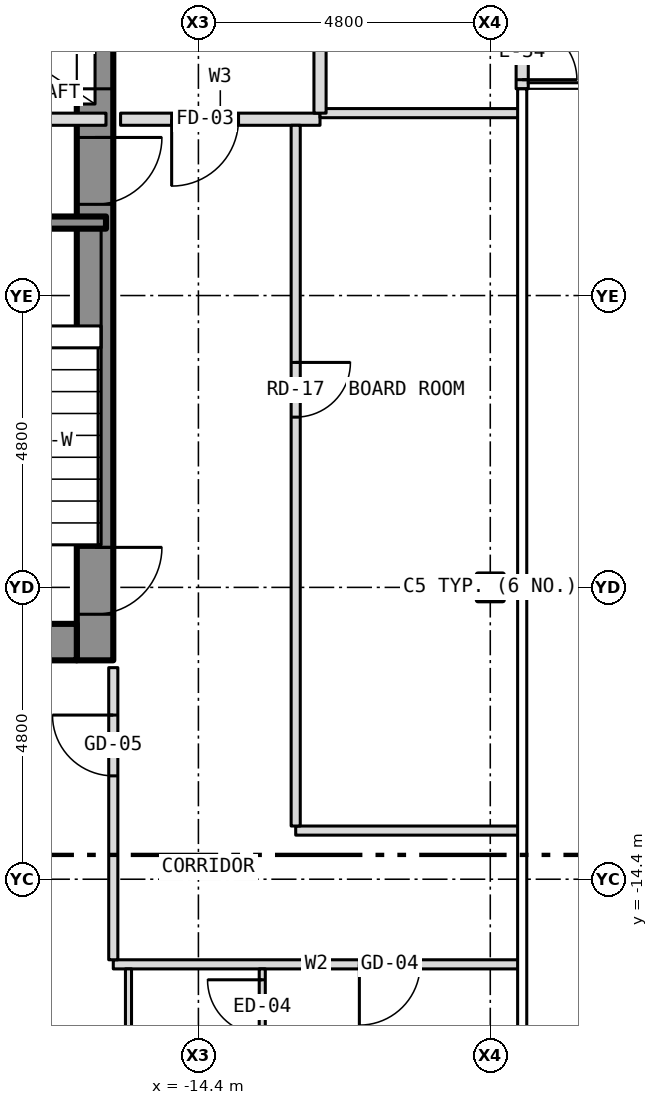
"""IFC4 building model, lengths in metres.
Left out: names, types, materials, properties, quantities, classifications, styles, units other than length and angle.
Written with IfcOpenShell. Run it as: python <this file> out.ifc"""

import sys

from ifc_helpers import new_model, si_unit, direction, frame, frame_2d, origin, origin_2d, place, context, subcontext, project, spatial, rectangle, i_section, extrude, element, fill, save


model = new_model("IFC4")
c1 = context("Model", 3, precision=1e-05, world=origin(), true_north=direction((0.0, 1.0)))
c2 = subcontext(c1, "Body", "Model", "MODEL_VIEW")
j1 = project(units=[si_unit("LENGTHUNIT", "METRE"), si_unit("PLANEANGLEUNIT", "RADIAN")], contexts=[c1])
p1 = place(None, origin())
s1 = spatial("IfcSite", under=j1, at=p1, CompositionType="ELEMENT")
p2 = place(p1, origin())
s2 = spatial("IfcBuilding", under=s1, at=p2, CompositionType="ELEMENT")
p3 = place(p2, frame((0.0, 0.0, 74.0)))
s3 = spatial("IfcBuildingStorey", under=s2, at=p3, CompositionType="ELEMENT", Elevation=74.0)
p4 = place(p3, frame((-9.6, -9.6, -0.15), z_axis=(0.0, 0.0, 1.0), x_axis=(1.0, 0.0, 0.0)))
e1 = element("IfcColumn", 1, at=p4, inside=s3, PredefinedType="COLUMN", context=c2, shape_type="SweptSolid", body=[
    extrude(i_section(OverallWidth=0.409, OverallDepth=0.424, WebThickness=0.033, FlangeThickness=0.052, at=origin_2d()), origin(), (0.0, 0.0, 1.0), 3.5),
])
p5 = place(p3, frame((-16.1, -10.8, 0.0), z_axis=(0.0, 0.0, 1.0), x_axis=(0.0, 1.0, 0.0)))
e2 = element("IfcWall", 2, at=p5, inside=s3, PredefinedType="SHEAR", context=c2, shape_type="SweptSolid", body=[
    extrude(rectangle(XDim=21.6, YDim=0.6, at=frame_2d((10.8, 0.0))), origin(), (0.0, 0.0, 1.0), 3.25),
])
p6 = place(p5, frame((9.4, 0.0, 0.0)))
e3 = element("IfcOpeningElement", 3, at=p6, cuts=e2, PredefinedType="OPENING", context=c2, shape_type="SweptSolid", body=[
    extrude(rectangle(XDim=1.1, YDim=2.1, at=frame_2d((0.55, 1.05))), frame((0.0, 0.312, 0.0), z_axis=(0.0, -1.0, 0.0), x_axis=(1.0, 0.0, 0.0)), (0.0, 0.0, 1.0), 0.624),
])
p7 = place(p5, frame((11.5, 0.0, 0.0)))
e4 = element("IfcOpeningElement", 4, at=p7, cuts=e2, PredefinedType="OPENING", context=c2, shape_type="SweptSolid", body=[
    extrude(rectangle(XDim=1.1, YDim=2.1, at=frame_2d((0.55, 1.05))), frame((0.0, 0.312, 0.0), z_axis=(0.0, -1.0, 0.0), x_axis=(1.0, 0.0, 0.0)), (0.0, 0.0, 1.0), 0.624),
])
p8 = place(p5, frame((13.6, 0.0, 0.0)))
e5 = element("IfcOpeningElement", 5, at=p8, cuts=e2, PredefinedType="OPENING", context=c2, shape_type="SweptSolid", body=[
    extrude(rectangle(XDim=1.1, YDim=2.1, at=frame_2d((0.55, 1.05))), frame((0.0, 0.312, 0.0), z_axis=(0.0, -1.0, 0.0), x_axis=(1.0, 0.0, 0.0)), (0.0, 0.0, 1.0), 0.624),
])
p9 = place(p5, frame((15.7, 0.0, 0.0)))
e6 = element("IfcOpeningElement", 6, at=p9, cuts=e2, PredefinedType="OPENING", context=c2, shape_type="SweptSolid", body=[
    extrude(rectangle(XDim=1.1, YDim=2.1, at=frame_2d((0.55, 1.05))), frame((0.0, 0.312, 0.0), z_axis=(0.0, -1.0, 0.0), x_axis=(1.0, 0.0, 0.0)), (0.0, 0.0, 1.0), 0.624),
])
p10 = place(p5, frame((17.8, 0.0, 0.0)))
e7 = element("IfcOpeningElement", 7, at=p10, cuts=e2, PredefinedType="OPENING", context=c2, shape_type="SweptSolid", body=[
    extrude(rectangle(XDim=1.1, YDim=2.1, at=frame_2d((0.55, 1.05))), frame((0.0, 0.312, 0.0), z_axis=(0.0, -1.0, 0.0), x_axis=(1.0, 0.0, 0.0)), (0.0, 0.0, 1.0), 0.624),
])
p11 = place(p5, frame((0.758, 0.0, 0.0)))
e8 = element("IfcOpeningElement", 8, at=p11, cuts=e2, PredefinedType="OPENING", context=c2, shape_type="SweptSolid", body=[
    extrude(rectangle(XDim=1.1, YDim=2.1, at=frame_2d((0.55, 1.05))), frame((0.0, 0.312, 0.0), z_axis=(0.0, -1.0, 0.0), x_axis=(1.0, 0.0, 0.0)), (0.0, 0.0, 1.0), 0.624),
])
p12 = place(p5, frame((7.5, 0.0, 0.0)))
e9 = element("IfcOpeningElement", 9, at=p12, cuts=e2, PredefinedType="OPENING", context=c2, shape_type="SweptSolid", body=[
    extrude(rectangle(XDim=1.1, YDim=2.1, at=frame_2d((0.55, 1.05))), frame((0.0, 0.312, 0.0), z_axis=(0.0, -1.0, 0.0), x_axis=(1.0, 0.0, 0.0)), (0.0, 0.0, 1.0), 0.624),
])
p13 = place(p3, frame((-23.4, -10.5, 0.0), z_axis=(0.0, 0.0, 1.0), x_axis=(1.0, 0.0, 0.0)))
e10 = element("IfcWall", 10, at=p13, inside=s3, PredefinedType="SHEAR", context=c2, shape_type="SweptSolid", body=[
    extrude(rectangle(XDim=7.0, YDim=0.6, at=frame_2d((3.5, 0.0))), origin(), (0.0, 0.0, 1.0), 3.25),
])
p14 = place(p3, frame((-9.075, -1.4, 0.0), z_axis=(0.0, 0.0, 1.0), x_axis=(0.0, 1.0, 0.0)))
e11 = element("IfcWall", 11, at=p14, inside=s3, PredefinedType="SOLIDWALL", context=c2, shape_type="SweptSolid", body=[
    extrude(rectangle(XDim=2.8, YDim=0.2, at=frame_2d((1.4, 0.0))), origin(), (0.0, 0.0, 1.0), 3.5),
])
p15 = place(p14, frame((0.15, 0.0, 0.0)))
e12 = element("IfcOpeningElement", 12, at=p15, cuts=e11, PredefinedType="OPENING", context=c2, shape_type="SweptSolid", body=[
    extrude(rectangle(XDim=0.9, YDim=2.1, at=frame_2d((0.45, 1.05))), frame((0.0, 0.112, 0.0), z_axis=(0.0, -1.0, 0.0), x_axis=(1.0, 0.0, 0.0)), (0.0, 0.0, 1.0), 0.224),
])
p16 = place(p14, frame((1.75, 0.0, 0.0)))
e13 = element("IfcOpeningElement", 13, at=p16, cuts=e11, PredefinedType="OPENING", context=c2, shape_type="SweptSolid", body=[
    extrude(rectangle(XDim=0.9, YDim=2.1, at=frame_2d((0.45, 1.05))), frame((0.0, 0.112, 0.0), z_axis=(0.0, -1.0, 0.0), x_axis=(1.0, 0.0, 0.0)), (0.0, 0.0, 1.0), 0.224),
])
p17 = place(p3, frame((-15.8, -15.8, 0.0), z_axis=(0.0, 0.0, 1.0), x_axis=(1.0, 0.0, 0.0)))
e14 = element("IfcWall", 14, at=p17, inside=s3, PredefinedType="PARTITIONING", context=c2, shape_type="SweptSolid", body=[
    extrude(rectangle(XDim=6.68, YDim=0.15, at=frame_2d((3.34, 0.0))), origin(), (0.0, 0.0, 1.0), 3.35),
])
p18 = place(p17, frame((4.047, 0.0, 0.0)))
e15 = element("IfcOpeningElement", 15, at=p18, cuts=e14, PredefinedType="OPENING", context=c2, shape_type="SweptSolid", body=[
    extrude(rectangle(XDim=1.0, YDim=2.1, at=frame_2d((0.5, 1.05))), frame((0.0, 0.087, 0.0), z_axis=(0.0, -1.0, 0.0), x_axis=(1.0, 0.0, 0.0)), (0.0, 0.0, 1.0), 0.174),
])
p19 = place(p3, frame((-12.8, -13.6, 0.0), z_axis=(0.0, 0.0, 1.0), x_axis=(1.0, 0.0, 0.0)))
e16 = element("IfcWall", 16, at=p19, inside=s3, PredefinedType="PARTITIONING", context=c2, shape_type="SweptSolid", body=[
    extrude(rectangle(XDim=3.68, YDim=0.15, at=frame_2d((1.84, 0.0))), origin(), (0.0, 0.0, 1.0), 3.35),
])
p20 = place(p3, frame((-20.0, -3.6, 0.0), z_axis=(0.0, 0.0, 1.0), x_axis=(1.0, 0.0, 0.0)))
e17 = element("IfcWall", 17, at=p20, inside=s3, PredefinedType="SHEAR", context=c2, shape_type="SweptSolid", body=[
    extrude(rectangle(XDim=4.08, YDim=0.2, at=frame_2d((2.04, 0.0))), origin(), (0.0, 0.0, 1.0), 3.25),
])
p21 = place(p3, frame((-23.88, -1.9, 0.0), z_axis=(0.0, 0.0, 1.0), x_axis=(1.0, 0.0, 0.0)))
e18 = element("IfcWall", 18, at=p21, inside=s3, PredefinedType="PARTITIONING", context=c2, shape_type="SweptSolid", body=[
    extrude(rectangle(XDim=7.96, YDim=0.2, at=frame_2d((3.98, 0.0))), origin(), (0.0, 0.0, 1.0), 3.25),
])
p22 = place(p21, frame((3.32, 0.0, 0.0)))
e19 = element("IfcOpeningElement", 19, at=p22, cuts=e18, PredefinedType="OPENING", context=c2, shape_type="SweptSolid", body=[
    extrude(rectangle(XDim=0.9, YDim=2.1, at=frame_2d((0.45, 1.05))), frame((0.0, 0.112, 0.0), z_axis=(0.0, -1.0, 0.0), x_axis=(1.0, 0.0, 0.0)), (0.0, 0.0, 1.0), 0.224),
])
p23 = place(p3, frame((-15.68, -1.9, 0.0), z_axis=(0.0, 0.0, 1.0), x_axis=(1.0, 0.0, 0.0)))
e20 = element("IfcWall", 20, at=p23, inside=s3, PredefinedType="PARTITIONING", context=c2, shape_type="SweptSolid", body=[
    extrude(rectangle(XDim=3.28, YDim=0.2, at=frame_2d((1.64, 0.0))), origin(), (0.0, 0.0, 1.0), 3.35),
])
p24 = place(p23, frame((0.84, 0.0, 0.0)))
e21 = element("IfcOpeningElement", 21, at=p24, cuts=e20, PredefinedType="OPENING", context=c2, shape_type="SweptSolid", body=[
    extrude(rectangle(XDim=1.1, YDim=2.1, at=frame_2d((0.55, 1.05))), frame((0.0, 0.112, 0.0), z_axis=(0.0, -1.0, 0.0), x_axis=(1.0, 0.0, 0.0)), (0.0, 0.0, 1.0), 0.224),
])
p25 = place(p3, frame((-12.4, -1.8, 0.0), z_axis=(0.0, 0.0, 1.0), x_axis=(1.0, 0.0, 0.0)))
e22 = element("IfcWall", 22, at=p25, inside=s3, PredefinedType="PARTITIONING", context=c2, shape_type="SweptSolid", body=[
    extrude(rectangle(XDim=3.28, YDim=0.15, at=frame_2d((1.64, 0.0))), origin(), (0.0, 0.0, 1.0), 3.35),
])
p26 = place(p3, frame((-15.8, -15.725, 0.0), z_axis=(0.0, 0.0, 1.0), x_axis=(0.0, 1.0, 0.0)))
e23 = element("IfcWall", 23, at=p26, inside=s3, PredefinedType="PARTITIONING", context=c2, shape_type="SweptSolid", body=[
    extrude(rectangle(XDim=4.805, YDim=0.15, at=frame_2d((2.403, 0.0))), origin(), (0.0, 0.0, 1.0), 3.35),
])
p27 = place(p26, frame((3.025, 0.0, 0.0)))
e24 = element("IfcOpeningElement", 24, at=p27, cuts=e23, PredefinedType="OPENING", context=c2, shape_type="SweptSolid", body=[
    extrude(rectangle(XDim=1.0, YDim=2.1, at=frame_2d((0.5, 1.05))), frame((0.0, 0.087, 0.0), z_axis=(0.0, -1.0, 0.0), x_axis=(1.0, 0.0, 0.0)), (0.0, 0.0, 1.0), 0.174),
])
p28 = place(p3, frame((-15.55, -23.88, 0.0), z_axis=(0.0, 0.0, 1.0), x_axis=(0.0, 1.0, 0.0)))
e25 = element("IfcWall", 25, at=p28, inside=s3, PredefinedType="PARTITIONING", context=c2, shape_type="SweptSolid", body=[
    extrude(rectangle(XDim=8.005, YDim=0.1, at=frame_2d((4.002, 0.0))), origin(), (0.0, 0.0, 1.0), 3.35),
])
p29 = place(p3, frame((-13.35, -18.95, 0.0), z_axis=(0.0, 0.0, 1.0), x_axis=(0.0, 1.0, 0.0)))
e26 = element("IfcWall", 26, at=p29, inside=s3, PredefinedType="PARTITIONING", context=c2, shape_type="SweptSolid", body=[
    extrude(rectangle(XDim=3.075, YDim=0.1, at=frame_2d((1.538, 0.0))), origin(), (0.0, 0.0, 1.0), 3.35),
])
p30 = place(p29, frame((1.996, 0.0, 0.0)))
e27 = element("IfcOpeningElement", 27, at=p30, cuts=e26, PredefinedType="OPENING", context=c2, shape_type="SweptSolid", body=[
    extrude(rectangle(XDim=0.9, YDim=2.1, at=frame_2d((0.45, 1.05))), frame((0.0, 0.062, 0.0), z_axis=(0.0, -1.0, 0.0), x_axis=(1.0, 0.0, 0.0)), (0.0, 0.0, 1.0), 0.124),
])
p31 = place(p3, frame((-12.8, -13.525, 0.0), z_axis=(0.0, 0.0, 1.0), x_axis=(0.0, 1.0, 0.0)))
e28 = element("IfcWall", 28, at=p31, inside=s3, PredefinedType="PARTITIONING", context=c2, shape_type="SweptSolid", body=[
    extrude(rectangle(XDim=11.525, YDim=0.15, at=frame_2d((5.762, 0.0))), origin(), (0.0, 0.0, 1.0), 3.35),
])
p32 = place(p31, frame((6.725, 0.0, 0.0)))
e29 = element("IfcOpeningElement", 29, at=p32, cuts=e28, PredefinedType="OPENING", context=c2, shape_type="SweptSolid", body=[
    extrude(rectangle(XDim=0.9, YDim=2.1, at=frame_2d((0.45, 1.05))), frame((0.0, 0.087, 0.0), z_axis=(0.0, -1.0, 0.0), x_axis=(1.0, 0.0, 0.0)), (0.0, 0.0, 1.0), 0.174),
])
p33 = place(p3, frame((-12.4, -1.8, 0.0), z_axis=(0.0, 0.0, 1.0), x_axis=(0.0, 1.0, 0.0)))
e30 = element("IfcWall", 30, at=p33, inside=s3, PredefinedType="PARTITIONING", context=c2, shape_type="SweptSolid", body=[
    extrude(rectangle(XDim=4.0, YDim=0.2, at=frame_2d((2.0, 0.0))), origin(), (0.0, 0.0, 1.0), 3.35),
])
p34 = place(p33, frame((1.25, 0.0, 0.0)))
e31 = element("IfcOpeningElement", 31, at=p34, cuts=e30, PredefinedType="OPENING", context=c2, shape_type="SweptSolid", body=[
    extrude(rectangle(XDim=1.1, YDim=2.1, at=frame_2d((0.55, 1.05))), frame((0.0, 0.112, 0.0), z_axis=(0.0, -1.0, 0.0), x_axis=(1.0, 0.0, 0.0)), (0.0, 0.0, 1.0), 0.224),
])
p35 = place(p15, origin())
e32 = element("IfcDoor", 32, at=p35, inside=s3, OperationType="SINGLE_SWING_LEFT", PredefinedType="DOOR", context=c2, shape_type="SweptSolid", body=[
    extrude(rectangle(XDim=0.9, YDim=2.1, at=frame_2d((0.45, 1.05))), frame((0.0, 0.025, 0.0), z_axis=(0.0, -1.0, 0.0), x_axis=(1.0, 0.0, 0.0)), (0.0, 0.0, 1.0), 0.05),
])
fill(e12, e32)
p36 = place(p6, origin())
e33 = element("IfcDoor", 33, at=p36, inside=s3, OperationType="SLIDING_TO_LEFT", PredefinedType="DOOR", context=c2, shape_type="SweptSolid", body=[
    extrude(rectangle(XDim=1.1, YDim=2.1, at=frame_2d((0.55, 1.05))), frame((0.0, 0.025, 0.0), z_axis=(0.0, -1.0, 0.0), x_axis=(1.0, 0.0, 0.0)), (0.0, 0.0, 1.0), 0.05),
])
fill(e3, e33)
p37 = place(p11, origin())
e34 = element("IfcDoor", 34, at=p37, inside=s3, OperationType="SINGLE_SWING_RIGHT", PredefinedType="DOOR", context=c2, shape_type="SweptSolid", body=[
    extrude(rectangle(XDim=1.1, YDim=2.1, at=frame_2d((0.55, 1.05))), frame((0.0, 0.025, 0.0), z_axis=(0.0, -1.0, 0.0), x_axis=(1.0, 0.0, 0.0)), (0.0, 0.0, 1.0), 0.05),
])
fill(e8, e34)
p38 = place(p12, origin())
e35 = element("IfcDoor", 35, at=p38, inside=s3, OperationType="SINGLE_SWING_RIGHT", PredefinedType="DOOR", context=c2, shape_type="SweptSolid", body=[
    extrude(rectangle(XDim=1.1, YDim=2.1, at=frame_2d((0.55, 1.05))), frame((0.0, 0.025, 0.0), z_axis=(0.0, -1.0, 0.0), x_axis=(1.0, 0.0, 0.0)), (0.0, 0.0, 1.0), 0.05),
])
fill(e9, e35)
p39 = place(p24, origin())
e36 = element("IfcDoor", 36, at=p39, inside=s3, OperationType="SINGLE_SWING_LEFT", PredefinedType="DOOR", context=c2, shape_type="SweptSolid", body=[
    extrude(rectangle(XDim=1.1, YDim=2.1, at=frame_2d((0.55, 1.05))), frame((0.0, 0.025, 0.0), z_axis=(0.0, -1.0, 0.0), x_axis=(1.0, 0.0, 0.0)), (0.0, 0.0, 1.0), 0.05),
])
fill(e21, e36)
p40 = place(p18, origin())
e37 = element("IfcDoor", 37, at=p40, inside=s3, OperationType="SINGLE_SWING_LEFT", PredefinedType="DOOR", context=c2, shape_type="SweptSolid", body=[
    extrude(rectangle(XDim=1.0, YDim=2.1, at=frame_2d((0.5, 1.05))), frame((0.0, 0.025, 0.0), z_axis=(0.0, -1.0, 0.0), x_axis=(1.0, 0.0, 0.0)), (0.0, 0.0, 1.0), 0.05),
])
fill(e15, e37)
p41 = place(p30, origin())
e38 = element("IfcDoor", 38, at=p41, inside=s3, OperationType="SINGLE_SWING_RIGHT", PredefinedType="DOOR", context=c2, shape_type="SweptSolid", body=[
    extrude(rectangle(XDim=0.9, YDim=2.1, at=frame_2d((0.45, 1.05))), frame((0.0, 0.025, 0.0), z_axis=(0.0, -1.0, 0.0), x_axis=(1.0, 0.0, 0.0)), (0.0, 0.0, 1.0), 0.05),
])
fill(e27, e38)
p42 = place(p27, origin())
e39 = element("IfcDoor", 39, at=p42, inside=s3, OperationType="SINGLE_SWING_RIGHT", PredefinedType="DOOR", context=c2, shape_type="SweptSolid", body=[
    extrude(rectangle(XDim=1.0, YDim=2.1, at=frame_2d((0.5, 1.05))), frame((0.0, 0.025, 0.0), z_axis=(0.0, -1.0, 0.0), x_axis=(1.0, 0.0, 0.0)), (0.0, 0.0, 1.0), 0.05),
])
fill(e24, e39)
p43 = place(p32, origin())
e40 = element("IfcDoor", 40, at=p43, inside=s3, OperationType="SINGLE_SWING_RIGHT", PredefinedType="DOOR", context=c2, shape_type="SweptSolid", body=[
    extrude(rectangle(XDim=0.9, YDim=2.1, at=frame_2d((0.45, 1.05))), frame((0.0, 0.025, 0.0), z_axis=(0.0, -1.0, 0.0), x_axis=(1.0, 0.0, 0.0)), (0.0, 0.0, 1.0), 0.05),
])
fill(e29, e40)
save(model, sys.argv[1])
